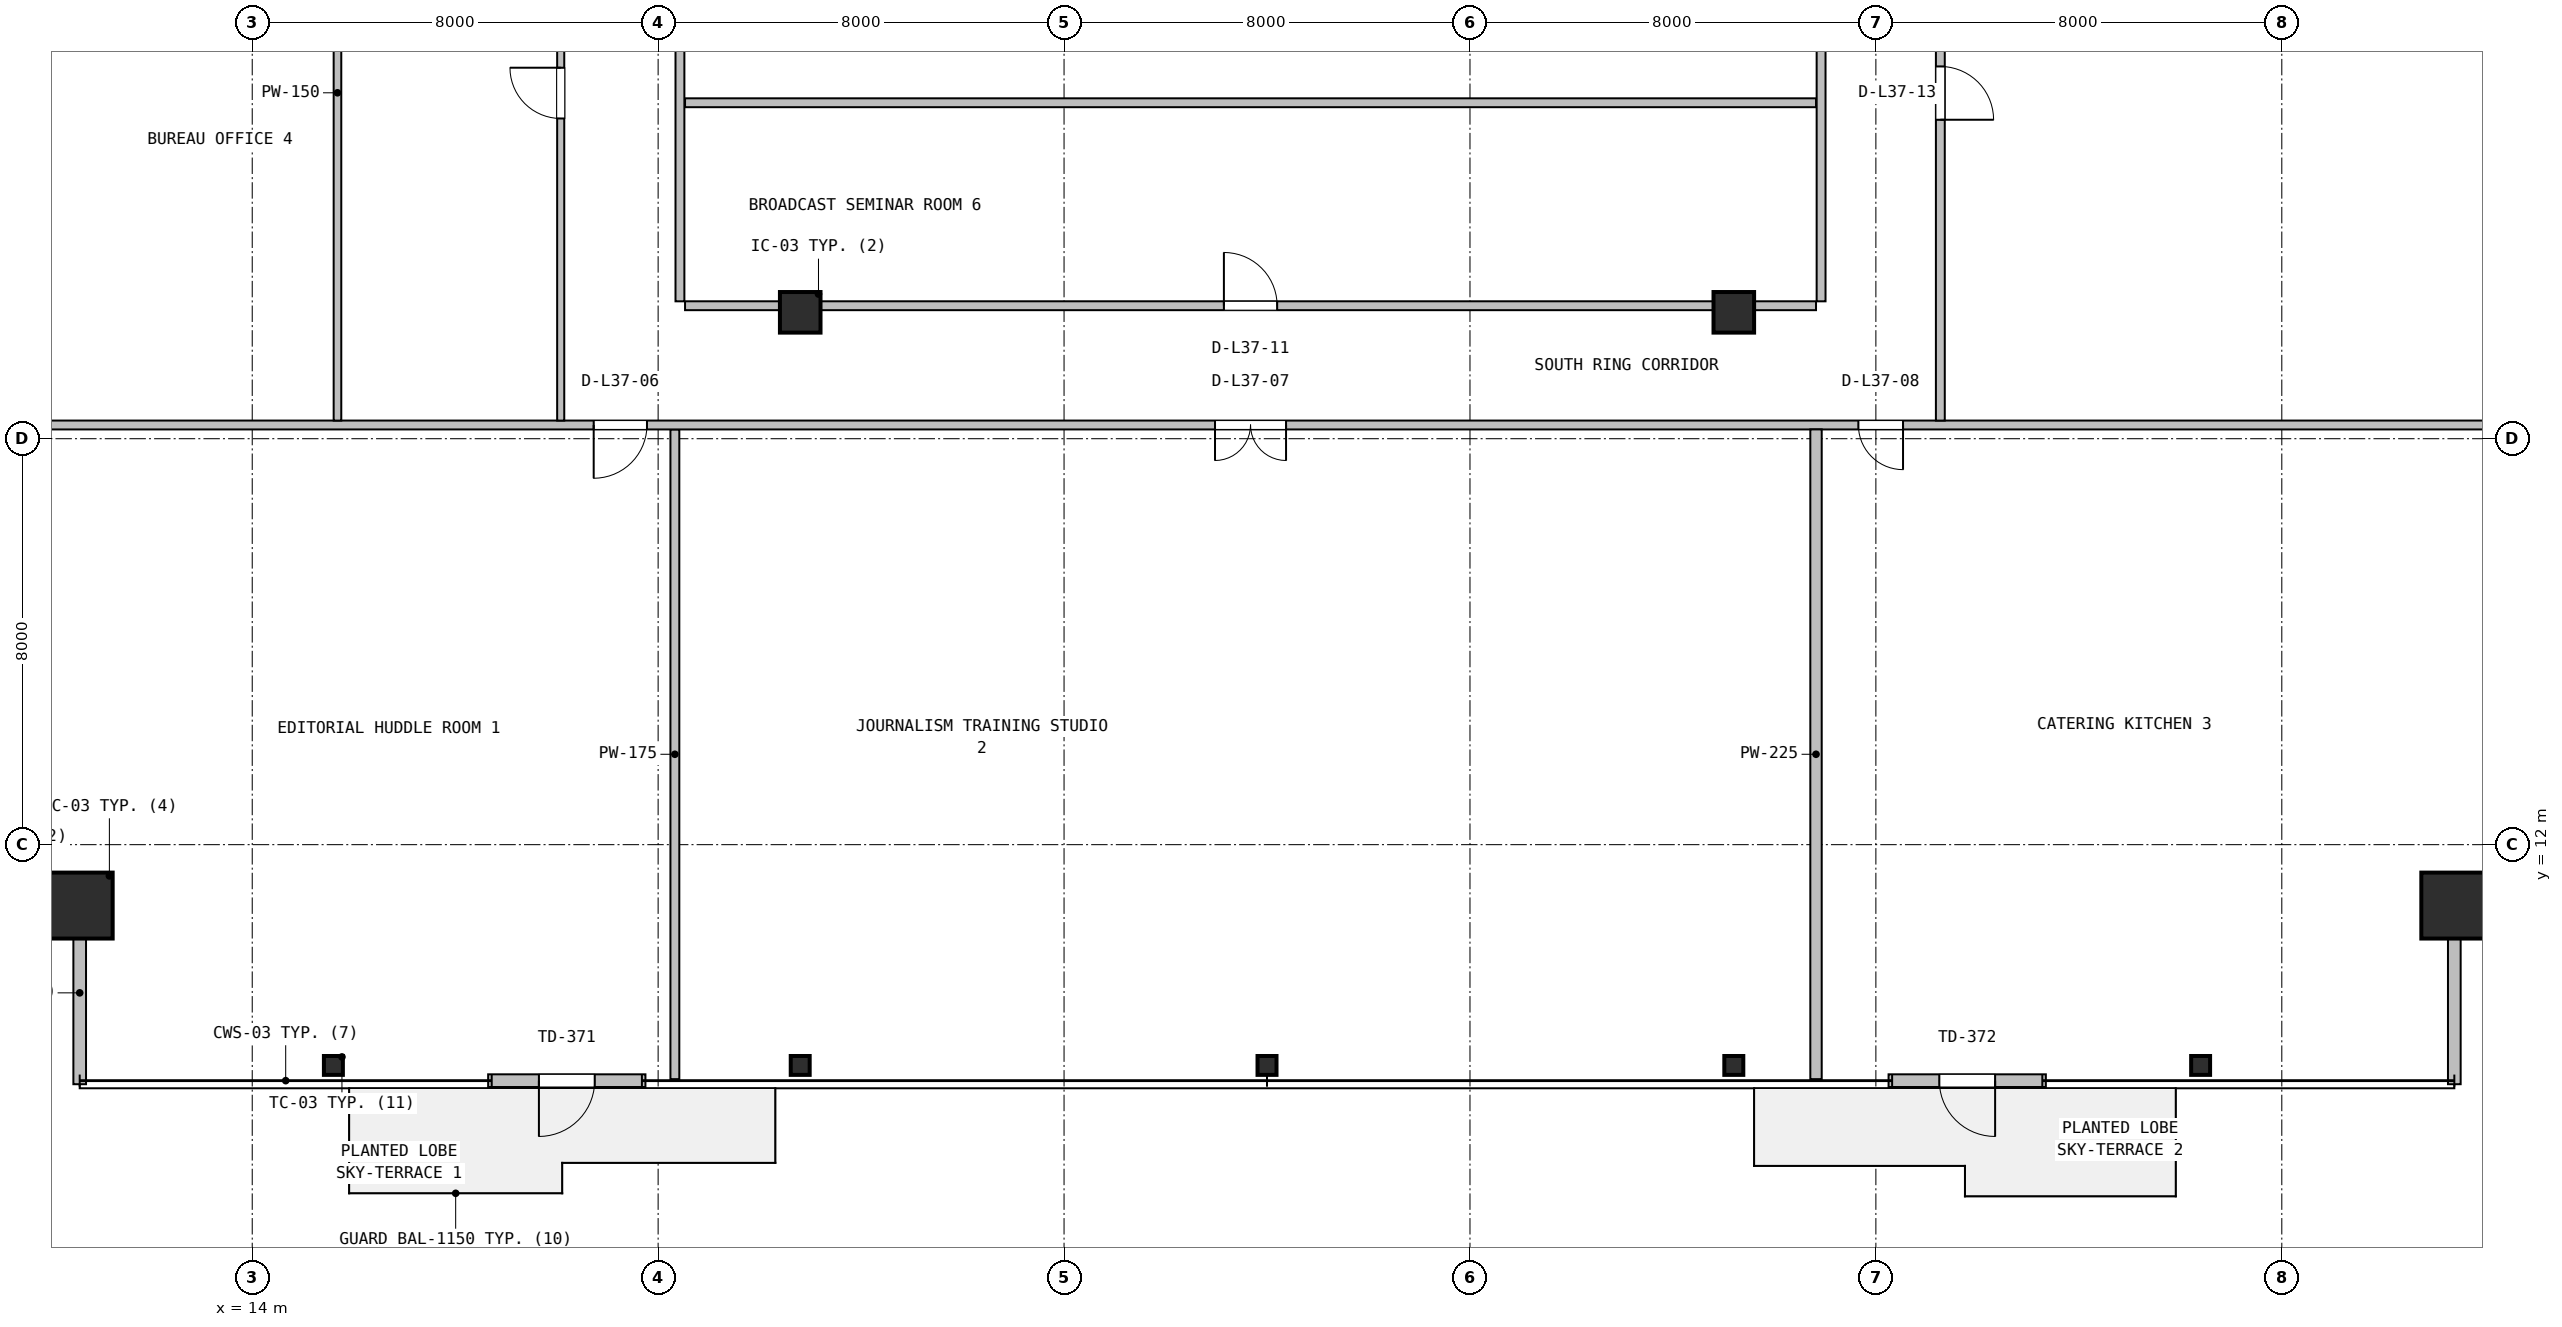
"""IFC4 building model, lengths in metres.
Left out: names, types, materials, properties, quantities, classifications, styles, units other than length and angle.
Written with IfcOpenShell. Run it as: python <this file> out.ifc"""

import sys

from ifc_helpers import new_model, si_unit, direction, frame, frame_2d, origin, origin_2d, place, context, subcontext, project, spatial, rectangle, hollow_rectangle, i_section, extrude, source, transform, mapped, element, fill, save


model = new_model("IFC4")
c1 = context("Model", 3, precision=1e-05, world=origin(), true_north=direction((0.0, 1.0)))
c2 = subcontext(c1, "Body", "Model", "MODEL_VIEW")
j1 = project(units=[si_unit("LENGTHUNIT", "METRE"), si_unit("PLANEANGLEUNIT", "RADIAN")], contexts=[c1])
p1 = place(None, origin())
s1 = spatial("IfcSite", under=j1, at=p1, CompositionType="ELEMENT")
p2 = place(p1, origin())
s2 = spatial("IfcBuilding", under=s1, at=p2, CompositionType="ELEMENT")
p3 = place(p2, frame((0.0, 0.0, 153.4)))
s3 = spatial("IfcBuildingStorey", under=s2, at=p3, CompositionType="ELEMENT", Elevation=153.4)
m1 = source(origin(), c2, "Body", "SweptSolid", [
    extrude(hollow_rectangle(XDim=1.3, YDim=1.3, WallThickness=0.05, at=origin_2d()), origin(), (0.0, 0.0, 1.0), 3.8),
])
for number, where, z_axis, x_axis in (
    (1, (10.6, 10.8, 0.0), (0.0, 0.0, 1.0), (1.0, 0.0, 0.0)),
    (2, (57.4, 10.8, 0.0), (0.0, 0.0, 1.0), (1.0, 0.0, 0.0)),
):
    element("IfcColumn", number, at=place(p3, frame(where, z_axis=z_axis, x_axis=x_axis)), inside=s3, PredefinedType="COLUMN", context=c2, shape_type="MappedRepresentation", body=[
        mapped(m1, transform((0.0, 0.0, 0.0), x_axis=(1.0, 0.0, 0.0), y_axis=(0.0, 1.0, 0.0), z_axis=(0.0, 0.0, 1.0), scale=1.0)),
    ])
m2 = source(origin(), c2, "Body", "SweptSolid", [
    extrude(i_section(OverallWidth=0.374, OverallDepth=0.372, WebThickness=0.016, FlangeThickness=0.026, FilletRadius=0.016, at=origin_2d()), origin(), (0.0, 0.0, 1.0), 3.8),
])
for number, where, z_axis, x_axis in (
    (3, (15.6, 7.65, 0.0), (0.0, 0.0, 1.0), (1.0, 0.0, 0.0)),
    (4, (24.8, 7.65, 0.0), (0.0, 0.0, 1.0), (1.0, 0.0, 0.0)),
    (5, (34.0, 7.65, 0.0), (0.0, 0.0, 1.0), (1.0, 0.0, 0.0)),
    (6, (43.2, 7.65, 0.0), (0.0, 0.0, 1.0), (1.0, 0.0, 0.0)),
    (7, (52.4, 7.65, 0.0), (0.0, 0.0, 1.0), (1.0, 0.0, 0.0)),
):
    element("IfcColumn", number, at=place(p3, frame(where, z_axis=z_axis, x_axis=x_axis)), inside=s3, PredefinedType="COLUMN", context=c2, shape_type="MappedRepresentation", body=[
        mapped(m2, transform((0.0, 0.0, 0.0), x_axis=(1.0, 0.0, 0.0), y_axis=(0.0, 1.0, 0.0), z_axis=(0.0, 0.0, 1.0), scale=1.0)),
    ])
m3 = source(origin(), c2, "Body", "SweptSolid", [
    extrude(rectangle(XDim=0.8, YDim=0.8, at=origin_2d()), origin(), (0.0, 0.0, 1.0), 3.8),
])
for number, where, z_axis, x_axis in (
    (8, (24.8, 22.49, 0.0), (0.0, 0.0, 1.0), (1.0, 0.0, 0.0)),
    (9, (43.2, 22.49, 0.0), (0.0, 0.0, 1.0), (1.0, 0.0, 0.0)),
):
    element("IfcColumn", number, at=place(p3, frame(where, z_axis=z_axis, x_axis=x_axis)), inside=s3, PredefinedType="COLUMN", context=c2, shape_type="MappedRepresentation", body=[
        mapped(m3, transform((0.0, 0.0, 0.0), x_axis=(1.0, 0.0, 0.0), y_axis=(0.0, 1.0, 0.0), z_axis=(0.0, 0.0, 1.0), scale=1.0)),
    ])
p4 = place(p3, frame((18.65, 7.35, 0.0), z_axis=(0.0, 0.0, 1.0), x_axis=(1.0, 0.0, 0.0)))
e10 = element("IfcWall", 10, at=p4, inside=s3, PredefinedType="SOLIDWALL", context=c2, shape_type="SweptSolid", body=[
    extrude(rectangle(XDim=3.1, YDim=0.25, at=frame_2d((1.55, 0.0))), origin(), (0.0, 0.0, 1.0), 3.53),
])
p5 = place(p4, frame((1.0, 0.0, 0.0)))
e11 = element("IfcOpeningElement", 11, at=p5, cuts=e10, PredefinedType="OPENING", context=c2, shape_type="SweptSolid", body=[
    extrude(rectangle(XDim=1.1, YDim=2.15, at=frame_2d((0.55, 1.075))), frame((0.0, 0.135, 0.0), z_axis=(0.0, -1.0, 0.0), x_axis=(1.0, 0.0, 0.0)), (0.0, 0.0, 1.0), 0.27),
])
p6 = place(p3, frame((46.25, 7.35, 0.0), z_axis=(0.0, 0.0, 1.0), x_axis=(1.0, 0.0, 0.0)))
e12 = element("IfcWall", 12, at=p6, inside=s3, PredefinedType="SOLIDWALL", context=c2, shape_type="SweptSolid", body=[
    extrude(rectangle(XDim=3.1, YDim=0.25, at=frame_2d((1.55, 0.0))), origin(), (0.0, 0.0, 1.0), 3.53),
])
p7 = place(p6, frame((1.0, 0.0, 0.0)))
e13 = element("IfcOpeningElement", 13, at=p7, cuts=e12, PredefinedType="OPENING", context=c2, shape_type="SweptSolid", body=[
    extrude(rectangle(XDim=1.1, YDim=2.15, at=frame_2d((0.55, 1.075))), frame((0.0, 0.135, 0.0), z_axis=(0.0, -1.0, 0.0), x_axis=(1.0, 0.0, 0.0)), (0.0, 0.0, 1.0), 0.27),
])
for number, where, z_axis, x_axis in (
    (14, (10.6, 7.28, 0.0), (0.0, 0.0, 1.0), (0.0, 1.0, 0.0)),
    (15, (57.4, 7.28, 0.0), (0.0, 0.0, 1.0), (0.0, 1.0, 0.0)),
):
    element("IfcWall", number, at=place(p3, frame(where, z_axis=z_axis, x_axis=x_axis)), inside=s3, PredefinedType="SOLIDWALL", context=c2, shape_type="SweptSolid", body=[
        extrude(rectangle(XDim=3.6, YDim=0.25, at=frame_2d((1.8, 0.0))), origin(), (0.0, 0.0, 1.0), 3.108),
    ])
p8 = place(p3, frame((22.33, 7.38, 0.0), z_axis=(0.0, 0.0, 1.0), x_axis=(0.0, 1.0, 0.0)))
e16 = element("IfcWall", 16, at=p8, inside=s3, PredefinedType="PARTITIONING", context=c2, shape_type="SweptSolid", body=[
    extrude(rectangle(XDim=12.803, YDim=0.175, at=frame_2d((6.402, 0.0))), origin(), (0.0, 0.0, 1.0), 3.108),
])
p9 = place(p3, frame((7.18, 20.27, 0.0), z_axis=(0.0, 0.0, 1.0), x_axis=(1.0, 0.0, 0.0)))
e17 = element("IfcWall", 17, at=p9, inside=s3, PredefinedType="PARTITIONING", context=c2, shape_type="SweptSolid", body=[
    extrude(rectangle(XDim=53.64, YDim=0.175, at=frame_2d((26.82, 0.0))), origin(), (0.0, 0.0, 1.0), 2.909),
])
p10 = place(p9, frame((13.55, 0.0, 0.0)))
e18 = element("IfcOpeningElement", 18, at=p10, cuts=e17, PredefinedType="OPENING", context=c2, shape_type="SweptSolid", body=[
    extrude(rectangle(XDim=1.05, YDim=2.1, at=frame_2d((0.525, 1.05))), frame((0.0, 0.098, 0.0), z_axis=(0.0, -1.0, 0.0), x_axis=(1.0, 0.0, 0.0)), (0.0, 0.0, 1.0), 0.195),
])
p11 = place(p9, frame((25.795, 0.0, 0.0)))
e19 = element("IfcOpeningElement", 19, at=p11, cuts=e17, PredefinedType="OPENING", context=c2, shape_type="SweptSolid", body=[
    extrude(rectangle(XDim=1.4, YDim=2.12, at=frame_2d((0.7, 1.06))), frame((0.0, 0.098, 0.0), z_axis=(0.0, -1.0, 0.0), x_axis=(1.0, 0.0, 0.0)), (0.0, 0.0, 1.0), 0.195),
])
p12 = place(p9, frame((38.475, 0.0, 0.0)))
e20 = element("IfcOpeningElement", 20, at=p12, cuts=e17, PredefinedType="OPENING", context=c2, shape_type="SweptSolid", body=[
    extrude(rectangle(XDim=0.88, YDim=2.06, at=frame_2d((0.44, 1.03))), frame((0.0, 0.098, 0.0), z_axis=(0.0, -1.0, 0.0), x_axis=(1.0, 0.0, 0.0)), (0.0, 0.0, 1.0), 0.195),
])
p13 = place(p3, frame((44.82, 7.38, 0.0), z_axis=(0.0, 0.0, 1.0), x_axis=(0.0, 1.0, 0.0)))
e21 = element("IfcWall", 21, at=p13, inside=s3, PredefinedType="PARTITIONING", context=c2, shape_type="SweptSolid", body=[
    extrude(rectangle(XDim=12.803, YDim=0.225, at=frame_2d((6.402, 0.0))), origin(), (0.0, 0.0, 1.0), 3.108),
])
p14 = place(p3, frame((15.68, 20.357, 0.0), z_axis=(0.0, 0.0, 1.0), x_axis=(0.0, 1.0, 0.0)))
e22 = element("IfcWall", 22, at=p14, inside=s3, PredefinedType="PARTITIONING", context=c2, shape_type="SweptSolid", body=[
    extrude(rectangle(XDim=12.918, YDim=0.15, at=frame_2d((6.459, 0.0))), origin(), (0.0, 0.0, 1.0), 3.222),
])
p15 = place(p3, frame((20.08, 20.357, 0.0), z_axis=(0.0, 0.0, 1.0), x_axis=(0.0, 1.0, 0.0)))
e23 = element("IfcWall", 23, at=p15, inside=s3, PredefinedType="PARTITIONING", context=c2, shape_type="SweptSolid", body=[
    extrude(rectangle(XDim=12.918, YDim=0.14, at=frame_2d((6.459, 0.0))), origin(), (0.0, 0.0, 1.0), 3.222),
])
p16 = place(p15, frame((5.953, 0.0, 0.0)))
e24 = element("IfcOpeningElement", 24, at=p16, cuts=e23, PredefinedType="OPENING", context=c2, shape_type="SweptSolid", body=[
    extrude(rectangle(XDim=1.0, YDim=2.1, at=frame_2d((0.5, 1.05))), frame((0.0, 0.08, 0.0), z_axis=(0.0, -1.0, 0.0), x_axis=(1.0, 0.0, 0.0)), (0.0, 0.0, 1.0), 0.16),
])
p17 = place(p3, frame((22.53, 22.62, 0.0), z_axis=(0.0, 0.0, 1.0), x_axis=(1.0, 0.0, 0.0)))
e25 = element("IfcWall", 25, at=p17, inside=s3, PredefinedType="PARTITIONING", context=c2, shape_type="SweptSolid", body=[
    extrude(rectangle(XDim=22.29, YDim=0.175, at=frame_2d((11.145, 0.0))), origin(), (0.0, 0.0, 1.0), 2.909),
])
p18 = place(p17, frame((10.62, 0.0, 0.0)))
e26 = element("IfcOpeningElement", 26, at=p18, cuts=e25, PredefinedType="OPENING", context=c2, shape_type="SweptSolid", body=[
    extrude(rectangle(XDim=1.05, YDim=2.1, at=frame_2d((0.525, 1.05))), frame((0.0, 0.098, 0.0), z_axis=(0.0, -1.0, 0.0), x_axis=(1.0, 0.0, 0.0)), (0.0, 0.0, 1.0), 0.195),
])
p19 = place(p3, frame((44.92, 22.707, 0.0), z_axis=(0.0, 0.0, 1.0), x_axis=(0.0, 1.0, 0.0)))
e27 = element("IfcWall", 27, at=p19, inside=s3, PredefinedType="PARTITIONING", context=c2, shape_type="SweptSolid", body=[
    extrude(rectangle(XDim=10.556, YDim=0.175, at=frame_2d((5.278, 0.0))), origin(), (0.0, 0.0, 1.0), 3.222),
])
p20 = place(p3, frame((22.53, 26.62, 0.0), z_axis=(0.0, 0.0, 1.0), x_axis=(1.0, 0.0, 0.0)))
e28 = element("IfcWall", 28, at=p20, inside=s3, PredefinedType="PARTITIONING", context=c2, shape_type="SweptSolid", body=[
    extrude(rectangle(XDim=22.29, YDim=0.175, at=frame_2d((11.145, 0.0))), origin(), (0.0, 0.0, 1.0), 2.909),
])
p21 = place(p3, frame((22.43, 22.707, 0.0), z_axis=(0.0, 0.0, 1.0), x_axis=(0.0, 1.0, 0.0)))
e29 = element("IfcWall", 29, at=p21, inside=s3, PredefinedType="PARTITIONING", context=c2, shape_type="SweptSolid", body=[
    extrude(rectangle(XDim=10.556, YDim=0.175, at=frame_2d((5.278, 0.0))), origin(), (0.0, 0.0, 1.0), 3.222),
])
p22 = place(p3, frame((47.27, 20.357, 0.0), z_axis=(0.0, 0.0, 1.0), x_axis=(0.0, 1.0, 0.0)))
e30 = element("IfcWall", 30, at=p22, inside=s3, PredefinedType="PARTITIONING", context=c2, shape_type="SweptSolid", body=[
    extrude(rectangle(XDim=12.906, YDim=0.175, at=frame_2d((6.453, 0.0))), origin(), (0.0, 0.0, 1.0), 3.222),
])
p23 = place(p22, frame((5.928, 0.0, 0.0)))
e31 = element("IfcOpeningElement", 31, at=p23, cuts=e30, PredefinedType="OPENING", context=c2, shape_type="SweptSolid", body=[
    extrude(rectangle(XDim=1.05, YDim=2.1, at=frame_2d((0.525, 1.05))), frame((0.0, 0.098, 0.0), z_axis=(0.0, -1.0, 0.0), x_axis=(1.0, 0.0, 0.0)), (0.0, 0.0, 1.0), 0.195),
])
m4 = source(origin(), c2, "Body", "SweptSolid", [
    extrude(rectangle(XDim=1.1, YDim=2.15, at=frame_2d((0.55, 1.075))), frame((0.0, 0.025, 0.0), z_axis=(0.0, -1.0, 0.0), x_axis=(1.0, 0.0, 0.0)), (0.0, 0.0, 1.0), 0.05),
])
p24 = place(p5, frame((1.1, 0.0, 0.0), z_axis=(0.0, 0.0, 1.0), x_axis=(-1.0, 0.0, 0.0)))
e32 = element("IfcDoor", 32, at=p24, inside=s3, OperationType="SINGLE_SWING_LEFT", PredefinedType="DOOR", context=c2, shape_type="MappedRepresentation", body=[
    mapped(m4, transform((0.0, 0.0, 0.0), x_axis=(1.0, 0.0, 0.0), y_axis=(0.0, 1.0, 0.0), z_axis=(0.0, 0.0, 1.0), scale=1.0)),
])
fill(e11, e32)
p25 = place(p7, frame((1.1, 0.0, 0.0), z_axis=(0.0, 0.0, 1.0), x_axis=(-1.0, 0.0, 0.0)))
e33 = element("IfcDoor", 33, at=p25, inside=s3, OperationType="SINGLE_SWING_RIGHT", PredefinedType="DOOR", context=c2, shape_type="MappedRepresentation", body=[
    mapped(m4, transform((0.0, 0.0, 0.0), x_axis=(1.0, 0.0, 0.0), y_axis=(0.0, 1.0, 0.0), z_axis=(0.0, 0.0, 1.0), scale=1.0)),
])
fill(e13, e33)
m5 = source(origin(), c2, "Body", "SweptSolid", [
    extrude(rectangle(XDim=1.05, YDim=2.1, at=frame_2d((0.525, 1.05))), frame((0.0, 0.025, 0.0), z_axis=(0.0, -1.0, 0.0), x_axis=(1.0, 0.0, 0.0)), (0.0, 0.0, 1.0), 0.05),
])
p26 = place(p10, frame((1.05, 0.0, 0.0), z_axis=(0.0, 0.0, 1.0), x_axis=(-1.0, 0.0, 0.0)))
e34 = element("IfcDoor", 34, at=p26, inside=s3, OperationType="SINGLE_SWING_LEFT", PredefinedType="DOOR", context=c2, shape_type="MappedRepresentation", body=[
    mapped(m5, transform((0.0, 0.0, 0.0), x_axis=(1.0, 0.0, 0.0), y_axis=(0.0, 1.0, 0.0), z_axis=(0.0, 0.0, 1.0), scale=1.0)),
])
fill(e18, e34)
m6 = source(origin(), c2, "Body", "SweptSolid", [
    extrude(rectangle(XDim=1.4, YDim=2.12, at=frame_2d((0.7, 1.06))), frame((0.0, 0.025, 0.0), z_axis=(0.0, -1.0, 0.0), x_axis=(1.0, 0.0, 0.0)), (0.0, 0.0, 1.0), 0.05),
])
p27 = place(p11, frame((1.4, 0.0, 0.0), z_axis=(0.0, 0.0, 1.0), x_axis=(-1.0, 0.0, 0.0)))
e35 = element("IfcDoor", 35, at=p27, inside=s3, OperationType="DOUBLE_DOOR_SINGLE_SWING", PredefinedType="DOOR", context=c2, shape_type="MappedRepresentation", body=[
    mapped(m6, transform((0.0, 0.0, 0.0), x_axis=(1.0, 0.0, 0.0), y_axis=(0.0, 1.0, 0.0), z_axis=(0.0, 0.0, 1.0), scale=1.0)),
])
fill(e19, e35)
m7 = source(origin(), c2, "Body", "SweptSolid", [
    extrude(rectangle(XDim=0.88, YDim=2.06, at=frame_2d((0.44, 1.03))), frame((0.0, 0.025, 0.0), z_axis=(0.0, -1.0, 0.0), x_axis=(1.0, 0.0, 0.0)), (0.0, 0.0, 1.0), 0.05),
])
p28 = place(p12, frame((0.88, 0.0, 0.0), z_axis=(0.0, 0.0, 1.0), x_axis=(-1.0, 0.0, 0.0)))
e36 = element("IfcDoor", 36, at=p28, inside=s3, OperationType="SINGLE_SWING_RIGHT", PredefinedType="DOOR", context=c2, shape_type="MappedRepresentation", body=[
    mapped(m7, transform((0.0, 0.0, 0.0), x_axis=(1.0, 0.0, 0.0), y_axis=(0.0, 1.0, 0.0), z_axis=(0.0, 0.0, 1.0), scale=1.0)),
])
fill(e20, e36)
m8 = source(origin(), c2, "Body", "SweptSolid", [
    extrude(rectangle(XDim=1.0, YDim=2.1, at=frame_2d((0.5, 1.05))), frame((0.0, 0.025, 0.0), z_axis=(0.0, -1.0, 0.0), x_axis=(1.0, 0.0, 0.0)), (0.0, 0.0, 1.0), 0.05),
])
p29 = place(p16, origin())
e37 = element("IfcDoor", 37, at=p29, inside=s3, OperationType="SINGLE_SWING_RIGHT", PredefinedType="DOOR", context=c2, shape_type="MappedRepresentation", body=[
    mapped(m8, transform((0.0, 0.0, 0.0), x_axis=(1.0, 0.0, 0.0), y_axis=(0.0, 1.0, 0.0), z_axis=(0.0, 0.0, 1.0), scale=1.0)),
])
fill(e24, e37)
p30 = place(p18, origin())
e38 = element("IfcDoor", 38, at=p30, inside=s3, OperationType="SINGLE_SWING_LEFT", PredefinedType="DOOR", context=c2, shape_type="MappedRepresentation", body=[
    mapped(m5, transform((0.0, 0.0, 0.0), x_axis=(1.0, 0.0, 0.0), y_axis=(0.0, 1.0, 0.0), z_axis=(0.0, 0.0, 1.0), scale=1.0)),
])
fill(e26, e38)
p31 = place(p23, frame((1.05, 0.0, 0.0), z_axis=(0.0, 0.0, 1.0), x_axis=(-1.0, 0.0, 0.0)))
e39 = element("IfcDoor", 39, at=p31, inside=s3, OperationType="SINGLE_SWING_LEFT", PredefinedType="DOOR", context=c2, shape_type="MappedRepresentation", body=[
    mapped(m5, transform((0.0, 0.0, 0.0), x_axis=(1.0, 0.0, 0.0), y_axis=(0.0, 1.0, 0.0), z_axis=(0.0, 0.0, 1.0), scale=1.0)),
])
fill(e31, e39)
save(model, sys.argv[1])
